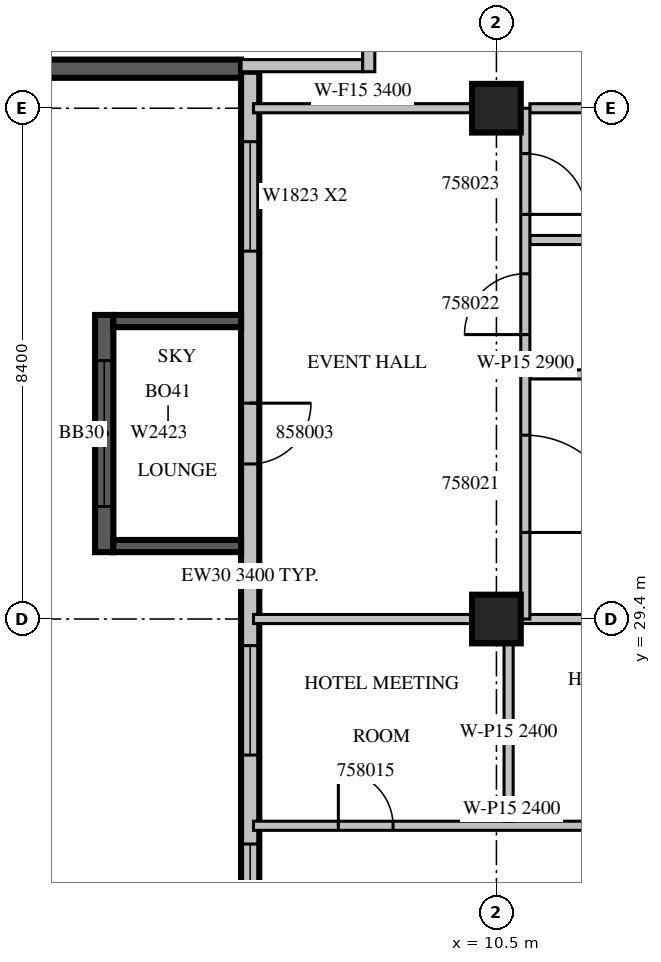
"""IFC4 building model, lengths in metres.
Left out: names, types, materials, properties, quantities, classifications, styles, units other than length and angle.
Written with IfcOpenShell. Run it as: python <this file> out.ifc"""

import sys

from ifc_helpers import new_model, si_unit, direction, frame, frame_2d, origin, origin_2d, place, context, subcontext, project, spatial, rectangle, extrude, source, transform, mapped, element, fill, save


model = new_model("IFC4")
c1 = context("Model", 3, precision=1e-05, world=origin(), true_north=direction((0.0, 1.0)))
c2 = subcontext(c1, "Body", "Model", "MODEL_VIEW")
j1 = project(units=[si_unit("LENGTHUNIT", "METRE"), si_unit("PLANEANGLEUNIT", "RADIAN")], contexts=[c1])
p1 = place(None, origin())
s1 = spatial("IfcSite", under=j1, at=p1, CompositionType="ELEMENT")
p2 = place(p1, origin())
s2 = spatial("IfcBuilding", under=s1, at=p2, CompositionType="ELEMENT")
p3 = place(p2, frame((0.0, 0.0, 253.8)))
s3 = spatial("IfcBuildingStorey", under=s2, at=p3, CompositionType="ELEMENT", Elevation=253.8)
m1 = source(origin(), c2, "Body", "SweptSolid", [
    extrude(rectangle(XDim=0.8, YDim=0.8, at=origin_2d()), origin(), (0.0, 0.0, 1.0), 3.8),
])
for number, where, z_axis, x_axis in (
    (1, (10.5, 29.4, 0.0), (0.0, 0.0, 1.0), (1.0, 0.0, 0.0)),
    (2, (10.5, 37.8, 0.0), (0.0, 0.0, 1.0), (1.0, 0.0, 0.0)),
):
    element("IfcColumn", number, at=place(p3, frame(where, z_axis=z_axis, x_axis=x_axis)), inside=s3, PredefinedType="COLUMN", context=c2, shape_type="MappedRepresentation", body=[
        mapped(m1, transform((0.0, 0.0, 0.0), scale=1.0)),
    ])
m2 = source(origin(), c2, "Body", "SweptSolid", [
    extrude(rectangle(XDim=6.1, YDim=0.3, at=frame_2d((3.05, 0.0))), origin(), (0.0, 0.0, 1.0), 3.4),
])
p4 = place(p3, frame((0.2, 38.45, 0.0), z_axis=(0.0, 0.0, 1.0), x_axis=(1.0, 0.0, 0.0)))
e3 = element("IfcWall", 3, at=p4, inside=s3, PredefinedType="SOLIDWALL", context=c2, shape_type="MappedRepresentation", body=[
    mapped(m2, transform((0.0, 0.0, 0.0), scale=1.0)),
])
m3 = source(origin(), c2, "Body", "SweptSolid", [
    extrude(rectangle(XDim=16.6, YDim=0.3, at=frame_2d((8.3, 0.0))), origin(), (0.0, 0.0, 1.0), 3.4),
])
p5 = place(p3, frame((6.45, 38.4, 0.0), z_axis=(0.0, 0.0, 1.0), x_axis=(0.0, -1.0, 0.0)))
e4 = element("IfcWall", 4, at=p5, inside=s3, PredefinedType="STANDARD", context=c2, shape_type="MappedRepresentation", body=[
    mapped(m3, transform((0.0, 0.0, 0.0), scale=1.0)),
])
m4 = source(origin(), c2, "Body", "SweptSolid", [
    extrude(rectangle(XDim=1.8, YDim=2.3, at=frame_2d((0.9, 1.15))), frame((0.0, 0.16, 0.0), z_axis=(0.0, -1.0, 0.0), x_axis=(1.0, 0.0, 0.0)), (0.0, 0.0, 1.0), 0.32),
])
p6 = place(p5, frame((1.15, 0.0, 0.6)))
e5 = element("IfcOpeningElement", 5, at=p6, cuts=e4, PredefinedType="OPENING", context=c2, shape_type="MappedRepresentation", body=[
    mapped(m4, transform((0.0, 0.0, 0.0), scale=1.0)),
])
p7 = place(p5, frame((9.438, 0.0, 0.6)))
e6 = element("IfcOpeningElement", 6, at=p7, cuts=e4, PredefinedType="OPENING", context=c2, shape_type="MappedRepresentation", body=[
    mapped(m4, transform((0.0, 0.0, 0.0), scale=1.0)),
])
m5 = source(origin(), c2, "Body", "SweptSolid", [
    extrude(rectangle(XDim=3.0, YDim=2.3, at=frame_2d((1.5, 1.15))), frame((0.0, 0.16, 0.0), z_axis=(0.0, -1.0, 0.0), x_axis=(1.0, 0.0, 0.0)), (0.0, 0.0, 1.0), 0.32),
])
p8 = place(p5, frame((12.7, 0.0, 0.6)))
e7 = element("IfcOpeningElement", 7, at=p8, cuts=e4, PredefinedType="OPENING", context=c2, shape_type="MappedRepresentation", body=[
    mapped(m5, transform((0.0, 0.0, 0.0), scale=1.0)),
])
m6 = source(origin(), c2, "Body", "SweptSolid", [
    extrude(rectangle(XDim=1.0, YDim=2.1, at=frame_2d((0.5, 1.05))), frame((0.0, 0.16, 0.0), z_axis=(0.0, -1.0, 0.0), x_axis=(1.0, 0.0, 0.0)), (0.0, 0.0, 1.0), 0.32),
])
p9 = place(p5, frame((5.45, 0.0, 0.0)))
e8 = element("IfcOpeningElement", 8, at=p9, cuts=e4, PredefinedType="OPENING", context=c2, shape_type="MappedRepresentation", body=[
    mapped(m6, transform((0.0, 0.0, 0.0), scale=1.0)),
])
m7 = source(origin(), c2, "Body", "SweptSolid", [
    extrude(rectangle(XDim=3.9, YDim=0.3, at=frame_2d((1.95, 0.0))), origin(), (0.0, 0.0, 1.0), 3.39),
])
p10 = place(p3, frame((4.05, 34.4, 0.0), z_axis=(0.0, 0.0, 1.0), x_axis=(0.0, -1.0, 0.0)))
e9 = element("IfcWall", 9, at=p10, inside=s3, PredefinedType="SOLIDWALL", context=c2, shape_type="MappedRepresentation", body=[
    mapped(m7, transform((0.0, 0.0, 0.0), scale=1.0)),
])
m8 = source(origin(), c2, "Body", "SweptSolid", [
    extrude(rectangle(XDim=2.4, YDim=2.3, at=frame_2d((1.2, 1.15))), frame((0.0, 0.16, 0.0), z_axis=(0.0, -1.0, 0.0), x_axis=(1.0, 0.0, 0.0)), (0.0, 0.0, 1.0), 0.32),
])
p11 = place(p10, frame((0.75, 0.0, 0.6)))
e10 = element("IfcOpeningElement", 10, at=p11, cuts=e9, PredefinedType="OPENING", context=c2, shape_type="MappedRepresentation", body=[
    mapped(m8, transform((0.0, 0.0, 0.0), scale=1.0)),
])
m9 = source(origin(), c2, "Body", "SweptSolid", [
    extrude(rectangle(XDim=2.1, YDim=0.2, at=frame_2d((1.05, 0.0))), origin(), (0.0, 0.0, 1.0), 3.39),
])
for number, where, z_axis, x_axis in (
    (11, (6.3, 34.3, 0.0), (0.0, 0.0, 1.0), (-1.0, 0.0, 0.0)),
    (12, (6.3, 30.6, 0.0), (0.0, 0.0, 1.0), (-1.0, 0.0, 0.0)),
):
    element("IfcWall", number, at=place(p3, frame(where, z_axis=z_axis, x_axis=x_axis)), inside=s3, PredefinedType="SOLIDWALL", context=c2, shape_type="MappedRepresentation", body=[
        mapped(m9, transform((0.0, 0.0, 0.0), scale=1.0)),
    ])
m10 = source(origin(), c2, "Body", "SweptSolid", [
    extrude(rectangle(XDim=2.0, YDim=0.2, at=frame_2d((1.0, 0.0))), origin(), (0.0, 0.0, 1.0), 3.4),
])
p12 = place(p3, frame((6.3, 38.5, 0.0), z_axis=(0.0, 0.0, 1.0), x_axis=(1.0, 0.0, 0.0)))
e13 = element("IfcWall", 13, at=p12, inside=s3, PredefinedType="PARTITIONING", context=c2, shape_type="MappedRepresentation", body=[
    mapped(m10, transform((0.0, 0.0, 0.0), scale=1.0)),
])
m11 = source(origin(), c2, "Body", "SweptSolid", [
    extrude(rectangle(XDim=5.45, YDim=0.2, at=frame_2d((2.725, 0.0))), origin(), (0.0, 0.0, 1.0), 3.4),
])
p13 = place(p3, frame((8.4, 38.4, 0.0), z_axis=(0.0, 0.0, 1.0), x_axis=(0.0, 1.0, 0.0)))
e14 = element("IfcWall", 14, at=p13, inside=s3, PredefinedType="PARTITIONING", context=c2, shape_type="MappedRepresentation", body=[
    mapped(m11, transform((0.0, 0.0, 0.0), scale=1.0)),
])
m12 = source(origin(), c2, "Body", "SweptSolid", [
    extrude(rectangle(XDim=1.2, YDim=2.1, at=frame_2d((0.6, 1.05))), frame((0.0, 0.11, 0.0), z_axis=(0.0, -1.0, 0.0), x_axis=(1.0, 0.0, 0.0)), (0.0, 0.0, 1.0), 0.22),
])
p14 = place(p13, frame((0.4, 0.0, 0.0)))
e15 = element("IfcOpeningElement", 15, at=p14, cuts=e14, PredefinedType="OPENING", context=c2, shape_type="MappedRepresentation", body=[
    mapped(m12, transform((0.0, 0.0, 0.0), scale=1.0)),
])
m13 = source(origin(), c2, "Body", "SweptSolid", [
    extrude(rectangle(XDim=0.9, YDim=2.1, at=frame_2d((0.45, 1.05))), frame((0.0, 0.11, 0.0), z_axis=(0.0, -1.0, 0.0), x_axis=(1.0, 0.0, 0.0)), (0.0, 0.0, 1.0), 0.22),
])
p15 = place(p13, frame((3.25, 0.0, 0.0)))
e16 = element("IfcOpeningElement", 16, at=p15, cuts=e14, PredefinedType="OPENING", context=c2, shape_type="MappedRepresentation", body=[
    mapped(m13, transform((0.0, 0.0, 0.0), scale=1.0)),
])
m14 = source(origin(), c2, "Body", "SweptSolid", [
    extrude(rectangle(XDim=8.495, YDim=0.15, at=frame_2d((4.247, 0.0))), origin(), (0.0, 0.0, 1.0), 2.4),
])
p16 = place(p3, frame((6.505, 26.0, 0.0), z_axis=(0.0, 0.0, 1.0), x_axis=(1.0, 0.0, 0.0)))
e17 = element("IfcWall", 17, at=p16, inside=s3, PredefinedType="PARTITIONING", context=c2, shape_type="MappedRepresentation", body=[
    mapped(m14, transform((0.0, 0.0, 0.0), scale=1.0)),
])
m15 = source(origin(), c2, "Body", "SweptSolid", [
    extrude(rectangle(XDim=0.9, YDim=2.1, at=frame_2d((0.45, 1.05))), frame((0.0, 0.085, 0.0), z_axis=(0.0, -1.0, 0.0), x_axis=(1.0, 0.0, 0.0)), (0.0, 0.0, 1.0), 0.17),
])
p17 = place(p16, frame((1.395, 0.0, 0.0)))
e18 = element("IfcOpeningElement", 18, at=p17, cuts=e17, PredefinedType="OPENING", context=c2, shape_type="MappedRepresentation", body=[
    mapped(m15, transform((0.0, 0.0, 0.0), scale=1.0)),
])
p18 = place(p16, frame((6.47, 0.0, 0.0)))
e19 = element("IfcOpeningElement", 19, at=p18, cuts=e17, PredefinedType="OPENING", context=c2, shape_type="MappedRepresentation", body=[
    mapped(m15, transform((0.0, 0.0, 0.0), scale=1.0)),
])
p19 = place(p3, frame((10.7, 26.075, 0.0), z_axis=(0.0, 0.0, 1.0), x_axis=(0.0, 1.0, 0.0)))
e20 = element("IfcWall", 20, at=p19, inside=s3, PredefinedType="PARTITIONING", context=c2, shape_type="SweptSolid", body=[
    extrude(rectangle(XDim=2.926, YDim=0.15, at=frame_2d((1.463, 0.0))), origin(), (0.0, 0.0, 1.0), 2.4),
])
m16 = source(origin(), c2, "Body", "SweptSolid", [
    extrude(rectangle(XDim=3.596, YDim=0.15, at=frame_2d((1.798, 0.0))), origin(), (0.0, 0.0, 1.0), 3.4),
])
p20 = place(p3, frame((10.101, 29.4, 0.0), z_axis=(0.0, 0.0, 1.0), x_axis=(-1.0, 0.0, 0.0)))
e21 = element("IfcWall", 21, at=p20, inside=s3, PredefinedType="PARTITIONING", context=c2, shape_type="MappedRepresentation", body=[
    mapped(m16, transform((0.0, 0.0, 0.0), scale=1.0)),
])
m17 = source(origin(), c2, "Body", "SweptSolid", [
    extrude(rectangle(XDim=4.101, YDim=0.15, at=frame_2d((2.05, 0.0))), origin(), (0.0, 0.0, 1.0), 3.4),
])
p21 = place(p3, frame((15.0, 29.4, 0.0), z_axis=(0.0, 0.0, 1.0), x_axis=(-1.0, 0.0, 0.0)))
e22 = element("IfcWall", 22, at=p21, inside=s3, PredefinedType="PARTITIONING", context=c2, shape_type="MappedRepresentation", body=[
    mapped(m17, transform((0.0, 0.0, 0.0), scale=1.0)),
])
m18 = source(origin(), c2, "Body", "SweptSolid", [
    extrude(rectangle(XDim=3.95, YDim=0.15, at=frame_2d((1.975, 0.0))), origin(), (0.0, 0.0, 1.0), 3.4),
])
for number, where, z_axis, x_axis in (
    (23, (15.0, 33.422, 0.0), (0.0, 0.0, 1.0), (-1.0, 0.0, 0.0)),
    (24, (15.0, 35.633, 0.0), (0.0, 0.0, 1.0), (-1.0, 0.0, 0.0)),
):
    element("IfcWall", number, at=place(p3, frame(where, z_axis=z_axis, x_axis=x_axis)), inside=s3, PredefinedType="PARTITIONING", context=c2, shape_type="MappedRepresentation", body=[
        mapped(m18, transform((0.0, 0.0, 0.0), scale=1.0)),
    ])
p22 = place(p3, frame((10.101, 37.8, 0.0), z_axis=(0.0, 0.0, 1.0), x_axis=(-1.0, 0.0, 0.0)))
e25 = element("IfcWall", 25, at=p22, inside=s3, PredefinedType="PARTITIONING", context=c2, shape_type="MappedRepresentation", body=[
    mapped(m16, transform((0.0, 0.0, 0.0), scale=1.0)),
])
p23 = place(p3, frame((15.0, 37.8, 0.0), z_axis=(0.0, 0.0, 1.0), x_axis=(-1.0, 0.0, 0.0)))
e26 = element("IfcWall", 26, at=p23, inside=s3, PredefinedType="PARTITIONING", context=c2, shape_type="MappedRepresentation", body=[
    mapped(m18, transform((0.0, 0.0, 0.0), scale=1.0)),
])
m19 = source(origin(), c2, "Body", "SweptSolid", [
    extrude(rectangle(XDim=8.4, YDim=0.15, at=frame_2d((4.2, 0.0))), origin(), (0.0, 0.0, 1.0), 2.9),
])
p24 = place(p3, frame((10.975, 29.4, 0.0), z_axis=(0.0, 0.0, 1.0), x_axis=(0.0, 1.0, 0.0)))
e27 = element("IfcWall", 27, at=p24, inside=s3, PredefinedType="PARTITIONING", context=c2, shape_type="MappedRepresentation", body=[
    mapped(m19, transform((0.0, 0.0, 0.0), scale=1.0)),
])
m20 = source(origin(), c2, "Body", "SweptSolid", [
    extrude(rectangle(XDim=1.6, YDim=2.1, at=frame_2d((0.8, 1.05))), frame((0.0, 0.085, 0.0), z_axis=(0.0, -1.0, 0.0), x_axis=(1.0, 0.0, 0.0)), (0.0, 0.0, 1.0), 0.17),
])
p25 = place(p24, frame((1.424, 0.0, 0.0)))
e28 = element("IfcOpeningElement", 28, at=p25, cuts=e27, PredefinedType="OPENING", context=c2, shape_type="MappedRepresentation", body=[
    mapped(m20, transform((0.0, 0.0, 0.0), scale=1.0)),
])
m21 = source(origin(), c2, "Body", "SweptSolid", [
    extrude(rectangle(XDim=1.0, YDim=2.1, at=frame_2d((0.5, 1.05))), frame((0.0, 0.085, 0.0), z_axis=(0.0, -1.0, 0.0), x_axis=(1.0, 0.0, 0.0)), (0.0, 0.0, 1.0), 0.17),
])
p26 = place(p24, frame((4.678, 0.0, 0.0)))
e29 = element("IfcOpeningElement", 29, at=p26, cuts=e27, PredefinedType="OPENING", context=c2, shape_type="MappedRepresentation", body=[
    mapped(m21, transform((0.0, 0.0, 0.0), scale=1.0)),
])
p27 = place(p24, frame((6.654, 0.0, 0.0)))
e30 = element("IfcOpeningElement", 30, at=p27, cuts=e27, PredefinedType="OPENING", context=c2, shape_type="MappedRepresentation", body=[
    mapped(m21, transform((0.0, 0.0, 0.0), scale=1.0)),
])
m22 = source(origin(), c2, "Body", "SweptSolid", [
    extrude(rectangle(XDim=1.8, YDim=2.3, at=frame_2d((0.9, 1.15))), frame((0.0, 0.03, 0.0), z_axis=(0.0, -1.0, 0.0), x_axis=(1.0, 0.0, 0.0)), (0.0, 0.0, 1.0), 0.06),
])
p28 = place(p6, origin())
e31 = element("IfcWindow", 31, at=p28, inside=s3, PartitioningType="SINGLE_PANEL", PredefinedType="WINDOW", context=c2, shape_type="MappedRepresentation", body=[
    mapped(m22, transform((0.0, 0.0, 0.0), scale=1.0)),
])
fill(e5, e31)
p29 = place(p7, origin())
e32 = element("IfcWindow", 32, at=p29, inside=s3, PartitioningType="SINGLE_PANEL", PredefinedType="WINDOW", context=c2, shape_type="MappedRepresentation", body=[
    mapped(m22, transform((0.0, 0.0, 0.0), scale=1.0)),
])
fill(e6, e32)
m23 = source(origin(), c2, "Body", "SweptSolid", [
    extrude(rectangle(XDim=3.0, YDim=2.3, at=frame_2d((1.5, 1.15))), frame((0.0, 0.03, 0.0), z_axis=(0.0, -1.0, 0.0), x_axis=(1.0, 0.0, 0.0)), (0.0, 0.0, 1.0), 0.06),
])
p30 = place(p8, origin())
e33 = element("IfcWindow", 33, at=p30, inside=s3, PartitioningType="SINGLE_PANEL", PredefinedType="WINDOW", context=c2, shape_type="MappedRepresentation", body=[
    mapped(m23, transform((0.0, 0.0, 0.0), scale=1.0)),
])
fill(e7, e33)
m24 = source(origin(), c2, "Body", "SweptSolid", [
    extrude(rectangle(XDim=2.4, YDim=2.3, at=frame_2d((1.2, 1.15))), frame((0.0, 0.03, 0.0), z_axis=(0.0, -1.0, 0.0), x_axis=(1.0, 0.0, 0.0)), (0.0, 0.0, 1.0), 0.06),
])
p31 = place(p11, origin())
e34 = element("IfcWindow", 34, at=p31, inside=s3, PartitioningType="SINGLE_PANEL", PredefinedType="WINDOW", context=c2, shape_type="MappedRepresentation", body=[
    mapped(m24, transform((0.0, 0.0, 0.0), scale=1.0)),
])
fill(e10, e34)
m25 = source(origin(), c2, "Body", "SweptSolid", [
    extrude(rectangle(XDim=0.9, YDim=2.1, at=frame_2d((0.45, 1.05))), frame((0.0, 0.025, 0.0), z_axis=(0.0, -1.0, 0.0), x_axis=(1.0, 0.0, 0.0)), (0.0, 0.0, 1.0), 0.05),
])
p32 = place(p17, origin())
e35 = element("IfcDoor", 35, at=p32, inside=s3, OperationType="SINGLE_SWING_LEFT", PredefinedType="DOOR", context=c2, shape_type="MappedRepresentation", body=[
    mapped(m25, transform((0.0, 0.0, 0.0), scale=1.0)),
])
fill(e18, e35)
m26 = source(origin(), c2, "Body", "SweptSolid", [
    extrude(rectangle(XDim=1.6, YDim=2.1, at=frame_2d((0.8, 1.05))), frame((0.0, 0.025, 0.0), z_axis=(0.0, -1.0, 0.0), x_axis=(1.0, 0.0, 0.0)), (0.0, 0.0, 1.0), 0.05),
])
p33 = place(p25, origin())
e36 = element("IfcDoor", 36, at=p33, inside=s3, OperationType="SINGLE_SWING_RIGHT", PredefinedType="DOOR", context=c2, shape_type="MappedRepresentation", body=[
    mapped(m26, transform((0.0, 0.0, 0.0), scale=1.0)),
])
fill(e28, e36)
m27 = source(origin(), c2, "Body", "SweptSolid", [
    extrude(rectangle(XDim=1.0, YDim=2.1, at=frame_2d((0.5, 1.05))), frame((0.0, 0.025, 0.0), z_axis=(0.0, -1.0, 0.0), x_axis=(1.0, 0.0, 0.0)), (0.0, 0.0, 1.0), 0.05),
])
p34 = place(p26, origin())
e37 = element("IfcDoor", 37, at=p34, inside=s3, OperationType="SINGLE_SWING_LEFT", PredefinedType="DOOR", context=c2, shape_type="MappedRepresentation", body=[
    mapped(m27, transform((0.0, 0.0, 0.0), scale=1.0)),
])
fill(e29, e37)
p35 = place(p27, origin())
e38 = element("IfcDoor", 38, at=p35, inside=s3, OperationType="SINGLE_SWING_RIGHT", PredefinedType="DOOR", context=c2, shape_type="MappedRepresentation", body=[
    mapped(m27, transform((0.0, 0.0, 0.0), scale=1.0)),
])
fill(e30, e38)
p36 = place(p9, origin())
e39 = element("IfcDoor", 39, at=p36, inside=s3, OperationType="SINGLE_SWING_LEFT", PredefinedType="DOOR", context=c2, shape_type="MappedRepresentation", body=[
    mapped(m27, transform((0.0, 0.0, 0.0), scale=1.0)),
])
fill(e8, e39)
save(model, sys.argv[1])
